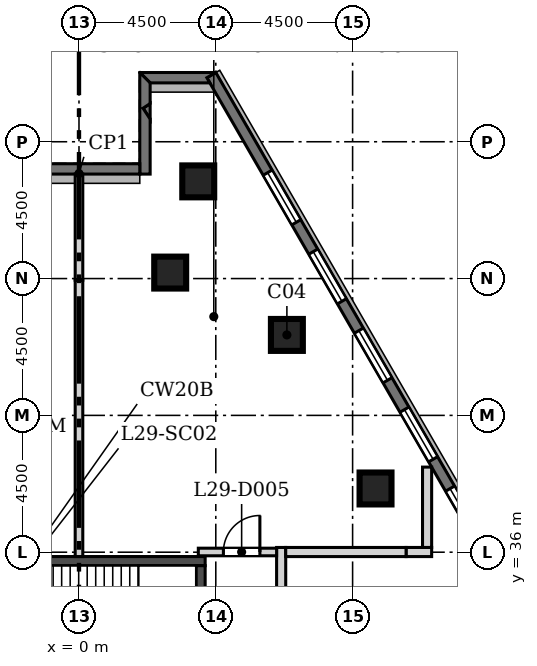
"""IFC4 building model, lengths in metres.
Left out: names, types, materials, properties, quantities, classifications, styles, units other than length and angle.
Written with IfcOpenShell. Run it as: python <this file> out.ifc"""

import sys

from ifc_helpers import new_model, si_unit, direction, frame, frame_2d, origin, origin_2d, place, context, subcontext, project, spatial, polyline, rectangle, outline, extrude, element, fill, save


model = new_model("IFC4")
c1 = context("Model", 3, precision=1e-05, world=origin(), true_north=direction((0.0, 1.0)))
c2 = subcontext(c1, "Body", "Model", "MODEL_VIEW")
j1 = project(units=[si_unit("LENGTHUNIT", "METRE"), si_unit("PLANEANGLEUNIT", "RADIAN")], contexts=[c1])
p1 = place(None, origin())
s1 = spatial("IfcSite", under=j1, at=p1, CompositionType="ELEMENT")
p2 = place(p1, origin())
s2 = spatial("IfcBuilding", under=s1, at=p2, CompositionType="ELEMENT")
p3 = place(p2, frame((0.0, 0.0, 132.1)))
s3 = spatial("IfcBuildingStorey", under=s2, at=p3, CompositionType="ELEMENT", Elevation=132.1)
for number, where, z_axis, x_axis in (
    (1, (9.754, 38.096, 0.0), (0.0, 0.0, 1.0), (1.0, 0.0, 0.0)),
    (2, (6.838, 43.146, 0.0), (0.0, 0.0, 1.0), (1.0, 0.0, 0.0)),
    (3, (3.923, 48.197, 0.0), (0.0, 0.0, 1.0), (1.0, 0.0, 0.0)),
    (4, (3.0, 45.197, 0.0), (0.0, 0.0, 1.0), (1.0, 0.0, 0.0)),
):
    element("IfcColumn", number, at=place(p3, frame(where, z_axis=z_axis, x_axis=x_axis)), inside=s3, PredefinedType="COLUMN", context=c2, shape_type="SweptSolid", body=[
        extrude(rectangle(XDim=1.05, YDim=1.05, at=origin_2d()), origin(), (0.0, 0.0, 1.0), 5.4),
    ])
p4 = place(p3, frame((29.746, 7.709, 0.0), z_axis=(0.0, 0.0, 1.0), x_axis=(-0.500000700546, 0.866024999324, 0.0)))
e5 = element("IfcWall", 5, at=p4, inside=s3, PredefinedType="SOLIDWALL", context=c2, shape_type="SweptSolid", body=[
    extrude(rectangle(XDim=50.787, YDim=0.34, at=frame_2d((25.393, 0.0))), origin(), (0.0, 0.0, 1.0), 5.0),
])
p5 = place(p4, frame((3.197, 0.0, 0.9)))
e6 = element("IfcOpeningElement", 6, at=p5, cuts=e5, PredefinedType="OPENING", context=c2, shape_type="SweptSolid", body=[
    extrude(rectangle(XDim=1.885, YDim=3.0, at=frame_2d((0.942, 1.5))), frame((0.0, 0.18, 0.0), z_axis=(0.0, -1.0, 0.0), x_axis=(1.0, 0.0, 0.0)), (0.0, 0.0, 1.0), 0.36),
])
p6 = place(p4, frame((6.197, 0.0, 0.9)))
e7 = element("IfcOpeningElement", 7, at=p6, cuts=e5, PredefinedType="OPENING", context=c2, shape_type="SweptSolid", body=[
    extrude(rectangle(XDim=1.885, YDim=3.0, at=frame_2d((0.942, 1.5))), frame((0.0, 0.18, 0.0), z_axis=(0.0, -1.0, 0.0), x_axis=(1.0, 0.0, 0.0)), (0.0, 0.0, 1.0), 0.36),
])
p7 = place(p4, frame((9.197, 0.0, 0.9)))
e8 = element("IfcOpeningElement", 8, at=p7, cuts=e5, PredefinedType="OPENING", context=c2, shape_type="SweptSolid", body=[
    extrude(rectangle(XDim=1.885, YDim=3.0, at=frame_2d((0.942, 1.5))), frame((0.0, 0.18, 0.0), z_axis=(0.0, -1.0, 0.0), x_axis=(1.0, 0.0, 0.0)), (0.0, 0.0, 1.0), 0.36),
])
p8 = place(p4, frame((12.197, 0.0, 0.9)))
e9 = element("IfcOpeningElement", 9, at=p8, cuts=e5, PredefinedType="OPENING", context=c2, shape_type="SweptSolid", body=[
    extrude(rectangle(XDim=1.885, YDim=3.0, at=frame_2d((0.942, 1.5))), frame((0.0, 0.18, 0.0), z_axis=(0.0, -1.0, 0.0), x_axis=(1.0, 0.0, 0.0)), (0.0, 0.0, 1.0), 0.36),
])
p9 = place(p4, frame((15.197, 0.0, 0.9)))
e10 = element("IfcOpeningElement", 10, at=p9, cuts=e5, PredefinedType="OPENING", context=c2, shape_type="SweptSolid", body=[
    extrude(rectangle(XDim=1.885, YDim=3.0, at=frame_2d((0.942, 1.5))), frame((0.0, 0.18, 0.0), z_axis=(0.0, -1.0, 0.0), x_axis=(1.0, 0.0, 0.0)), (0.0, 0.0, 1.0), 0.36),
])
p10 = place(p4, frame((18.197, 0.0, 0.9)))
e11 = element("IfcOpeningElement", 11, at=p10, cuts=e5, PredefinedType="OPENING", context=c2, shape_type="SweptSolid", body=[
    extrude(rectangle(XDim=1.885, YDim=3.0, at=frame_2d((0.942, 1.5))), frame((0.0, 0.18, 0.0), z_axis=(0.0, -1.0, 0.0), x_axis=(1.0, 0.0, 0.0)), (0.0, 0.0, 1.0), 0.36),
])
p11 = place(p4, frame((21.197, 0.0, 0.9)))
e12 = element("IfcOpeningElement", 12, at=p11, cuts=e5, PredefinedType="OPENING", context=c2, shape_type="SweptSolid", body=[
    extrude(rectangle(XDim=1.885, YDim=3.0, at=frame_2d((0.942, 1.5))), frame((0.0, 0.18, 0.0), z_axis=(0.0, -1.0, 0.0), x_axis=(1.0, 0.0, 0.0)), (0.0, 0.0, 1.0), 0.36),
])
p12 = place(p4, frame((24.197, 0.0, 0.9)))
e13 = element("IfcOpeningElement", 13, at=p12, cuts=e5, PredefinedType="OPENING", context=c2, shape_type="SweptSolid", body=[
    extrude(rectangle(XDim=1.885, YDim=3.0, at=frame_2d((0.942, 1.5))), frame((0.0, 0.18, 0.0), z_axis=(0.0, -1.0, 0.0), x_axis=(1.0, 0.0, 0.0)), (0.0, 0.0, 1.0), 0.36),
])
p13 = place(p4, frame((27.197, 0.0, 0.9)))
e14 = element("IfcOpeningElement", 14, at=p13, cuts=e5, PredefinedType="OPENING", context=c2, shape_type="SweptSolid", body=[
    extrude(rectangle(XDim=1.885, YDim=3.0, at=frame_2d((0.942, 1.5))), frame((0.0, 0.18, 0.0), z_axis=(0.0, -1.0, 0.0), x_axis=(1.0, 0.0, 0.0)), (0.0, 0.0, 1.0), 0.36),
])
p14 = place(p4, frame((30.197, 0.0, 0.9)))
e15 = element("IfcOpeningElement", 15, at=p14, cuts=e5, PredefinedType="OPENING", context=c2, shape_type="SweptSolid", body=[
    extrude(rectangle(XDim=1.885, YDim=3.0, at=frame_2d((0.942, 1.5))), frame((0.0, 0.18, 0.0), z_axis=(0.0, -1.0, 0.0), x_axis=(1.0, 0.0, 0.0)), (0.0, 0.0, 1.0), 0.36),
])
p15 = place(p4, frame((33.197, 0.0, 0.9)))
e16 = element("IfcOpeningElement", 16, at=p15, cuts=e5, PredefinedType="OPENING", context=c2, shape_type="SweptSolid", body=[
    extrude(rectangle(XDim=1.885, YDim=3.0, at=frame_2d((0.942, 1.5))), frame((0.0, 0.18, 0.0), z_axis=(0.0, -1.0, 0.0), x_axis=(1.0, 0.0, 0.0)), (0.0, 0.0, 1.0), 0.36),
])
p16 = place(p4, frame((36.197, 0.0, 0.9)))
e17 = element("IfcOpeningElement", 17, at=p16, cuts=e5, PredefinedType="OPENING", context=c2, shape_type="SweptSolid", body=[
    extrude(rectangle(XDim=1.885, YDim=3.0, at=frame_2d((0.942, 1.5))), frame((0.0, 0.18, 0.0), z_axis=(0.0, -1.0, 0.0), x_axis=(1.0, 0.0, 0.0)), (0.0, 0.0, 1.0), 0.36),
])
p17 = place(p4, frame((39.197, 0.0, 0.9)))
e18 = element("IfcOpeningElement", 18, at=p17, cuts=e5, PredefinedType="OPENING", context=c2, shape_type="SweptSolid", body=[
    extrude(rectangle(XDim=1.885, YDim=3.0, at=frame_2d((0.942, 1.5))), frame((0.0, 0.18, 0.0), z_axis=(0.0, -1.0, 0.0), x_axis=(1.0, 0.0, 0.0)), (0.0, 0.0, 1.0), 0.36),
])
p18 = place(p4, frame((42.197, 0.0, 0.9)))
e19 = element("IfcOpeningElement", 19, at=p18, cuts=e5, PredefinedType="OPENING", context=c2, shape_type="SweptSolid", body=[
    extrude(rectangle(XDim=1.885, YDim=3.0, at=frame_2d((0.942, 1.5))), frame((0.0, 0.18, 0.0), z_axis=(0.0, -1.0, 0.0), x_axis=(1.0, 0.0, 0.0)), (0.0, 0.0, 1.0), 0.36),
])
p19 = place(p4, frame((45.197, 0.0, 0.9)))
e20 = element("IfcOpeningElement", 20, at=p19, cuts=e5, PredefinedType="OPENING", context=c2, shape_type="SweptSolid", body=[
    extrude(rectangle(XDim=1.885, YDim=3.0, at=frame_2d((0.942, 1.5))), frame((0.0, 0.18, 0.0), z_axis=(0.0, -1.0, 0.0), x_axis=(1.0, 0.0, 0.0)), (0.0, 0.0, 1.0), 0.36),
])
p20 = place(p3, origin())
e21 = element("IfcWall", 21, at=p20, inside=s3, PredefinedType="SOLIDWALL", context=c2, shape_type="SweptSolid", body=[
    extrude(outline(polyline([(1.999, 51.777), (4.501, 51.777), (4.501, 51.777), (4.206, 51.606), (4.305, 51.436), (2.34, 51.436), (1.999, 51.777), (1.999, 51.777)])), origin(), (0.0, 0.0, 1.0), 5.0),
])
p21 = place(p3, origin())
e22 = element("IfcWall", 22, at=p21, inside=s3, PredefinedType="SOLIDWALL", context=c2, shape_type="SweptSolid", body=[
    extrude(outline(polyline([(2.341, 50.246), (2.107, 50.602), (2.341, 50.755), (2.341, 50.246)])), origin(), (0.0, 0.0, 1.0), 4.4),
])
p22 = place(p3, origin())
e23 = element("IfcWall", 23, at=p22, inside=s3, PredefinedType="SOLIDWALL", context=c2, shape_type="SweptSolid", body=[
    extrude(outline(polyline([(2.0, 48.436), (2.0, 51.778), (2.0, 51.778), (2.341, 51.437), (2.341, 50.755), (2.107, 50.602), (2.341, 50.246), (2.341, 48.436), (2.0, 48.436)])), origin(), (0.0, 0.0, 1.0), 5.0),
])
p23 = place(p3, frame((2.0, 48.607, 0.0), z_axis=(0.0, 0.0, 1.0), x_axis=(-1.0, 0.0, 0.0)))
e24 = element("IfcWall", 24, at=p23, inside=s3, PredefinedType="SOLIDWALL", context=c2, shape_type="SweptSolid", body=[
    extrude(rectangle(XDim=4.0, YDim=0.34, at=frame_2d((2.0, 0.0))), origin(), (0.0, 0.0, 1.0), 5.0),
])
p24 = place(p3, frame((-4.15, 35.707, -0.4), z_axis=(0.0, 0.0, 1.0), x_axis=(1.0, 0.0, 0.0)))
e25 = element("IfcWall", 25, at=p24, inside=s3, PredefinedType="SOLIDWALL", context=c2, shape_type="SweptSolid", body=[
    extrude(rectangle(XDim=8.3, YDim=0.3, at=frame_2d((4.15, 0.0))), origin(), (0.0, 0.0, 1.0), 5.4),
])
p25 = place(p3, frame((4.0, 29.057, -0.4), z_axis=(0.0, 0.0, 1.0), x_axis=(0.0, 1.0, 0.0)))
e26 = element("IfcWall", 26, at=p25, inside=s3, PredefinedType="SOLIDWALL", context=c2, shape_type="SweptSolid", body=[
    extrude(rectangle(XDim=6.5, YDim=0.3, at=frame_2d((3.25, 0.0))), origin(), (0.0, 0.0, 1.0), 5.4),
])
p26 = place(p3, frame((6.65, 36.156, 0.0), z_axis=(0.0, 0.0, 1.0), x_axis=(0.0, -1.0, 0.0)))
e27 = element("IfcWall", 27, at=p26, inside=s3, PredefinedType="SOLIDWALL", context=c2, shape_type="SweptSolid", body=[
    extrude(rectangle(XDim=13.357, YDim=0.3, at=frame_2d((6.678, 0.0))), origin(), (0.0, 0.0, 1.0), 5.0),
])
p27 = place(p3, frame((0.0, 48.437, 0.0), z_axis=(0.0, 0.0, 1.0), x_axis=(0.0, -1.0, 0.0)))
e28 = element("IfcWall", 28, at=p27, inside=s3, PredefinedType="SOLIDWALL", context=c2, shape_type="SweptSolid", body=[
    extrude(rectangle(XDim=3.49, YDim=0.25, at=frame_2d((1.745, 0.0))), origin(), (0.0, 0.0, 1.0), 5.0),
])
p28 = place(p3, frame((11.6, 36.006, 0.0), z_axis=(0.0, 0.0, 1.0), x_axis=(-1.0, 0.0, 0.0)))
e29 = element("IfcWall", 29, at=p28, inside=s3, PredefinedType="SOLIDWALL", context=c2, shape_type="SweptSolid", body=[
    extrude(rectangle(XDim=0.842, YDim=0.3, at=frame_2d((0.421, 0.0))), origin(), (0.0, 0.0, 1.0), 5.0),
])
p29 = place(p3, frame((11.45, 38.799, 0.0), z_axis=(0.0, 0.0, 1.0), x_axis=(0.0, -1.0, 0.0)))
e30 = element("IfcWall", 30, at=p29, inside=s3, PredefinedType="SOLIDWALL", context=c2, shape_type="SweptSolid", body=[
    extrude(rectangle(XDim=2.643, YDim=0.3, at=frame_2d((1.322, 0.0))), origin(), (0.0, 0.0, 1.0), 5.0),
])
p30 = place(p3, frame((3.925, 36.007, 0.0), z_axis=(0.0, 0.0, 1.0), x_axis=(1.0, 0.0, 0.0)))
e31 = element("IfcWall", 31, at=p30, inside=s3, PredefinedType="SOLIDWALL", context=c2, shape_type="SweptSolid", body=[
    extrude(rectangle(XDim=2.575, YDim=0.25, at=frame_2d((1.288, 0.0))), origin(), (0.0, 0.0, 1.0), 4.1),
])
p31 = place(p30, frame((0.825, 0.0, 0.0)))
e32 = element("IfcOpeningElement", 32, at=p31, cuts=e31, PredefinedType="OPENING", context=c2, shape_type="SweptSolid", body=[
    extrude(rectangle(XDim=1.2, YDim=2.1, at=frame_2d((0.6, 1.05))), frame((0.0, 0.135, 0.0), z_axis=(0.0, -1.0, 0.0), x_axis=(1.0, 0.0, 0.0)), (0.0, 0.0, 1.0), 0.27),
])
p32 = place(p3, frame((0.0, 44.947, 0.0), z_axis=(0.0, 0.0, 1.0), x_axis=(0.0, -1.0, 0.0)))
e33 = element("IfcWall", 33, at=p32, inside=s3, PredefinedType="SOLIDWALL", context=c2, shape_type="SweptSolid", body=[
    extrude(rectangle(XDim=9.09, YDim=0.25, at=frame_2d((4.545, 0.0))), origin(), (0.0, 0.0, 1.0), 4.25),
])
p33 = place(p3, frame((10.758, 36.006, 0.0), z_axis=(0.0, 0.0, 1.0), x_axis=(-1.0, 0.0, 0.0)))
e34 = element("IfcWall", 34, at=p33, inside=s3, PredefinedType="SOLIDWALL", context=c2, shape_type="SweptSolid", body=[
    extrude(rectangle(XDim=3.958, YDim=0.3, at=frame_2d((1.979, 0.0))), origin(), (0.0, 0.0, 1.0), 4.1),
])
p34 = place(p15, origin())
e35 = element("IfcWindow", 35, at=p34, inside=s3, PartitioningType="SINGLE_PANEL", PredefinedType="WINDOW", context=c2, shape_type="SweptSolid", body=[
    extrude(rectangle(XDim=1.885, YDim=3.0, at=frame_2d((0.942, 1.5))), frame((0.0, 0.11, 0.0), z_axis=(0.0, -1.0, 0.0), x_axis=(1.0, 0.0, 0.0)), (0.0, 0.0, 1.0), 0.06),
])
fill(e16, e35)
p35 = place(p16, origin())
e36 = element("IfcWindow", 36, at=p35, inside=s3, PartitioningType="SINGLE_PANEL", PredefinedType="WINDOW", context=c2, shape_type="SweptSolid", body=[
    extrude(rectangle(XDim=1.885, YDim=3.0, at=frame_2d((0.942, 1.5))), frame((0.0, 0.11, 0.0), z_axis=(0.0, -1.0, 0.0), x_axis=(1.0, 0.0, 0.0)), (0.0, 0.0, 1.0), 0.06),
])
fill(e17, e36)
p36 = place(p17, origin())
e37 = element("IfcWindow", 37, at=p36, inside=s3, PartitioningType="SINGLE_PANEL", PredefinedType="WINDOW", context=c2, shape_type="SweptSolid", body=[
    extrude(rectangle(XDim=1.885, YDim=3.0, at=frame_2d((0.942, 1.5))), frame((0.0, 0.11, 0.0), z_axis=(0.0, -1.0, 0.0), x_axis=(1.0, 0.0, 0.0)), (0.0, 0.0, 1.0), 0.06),
])
fill(e18, e37)
p37 = place(p18, origin())
e38 = element("IfcWindow", 38, at=p37, inside=s3, PartitioningType="SINGLE_PANEL", PredefinedType="WINDOW", context=c2, shape_type="SweptSolid", body=[
    extrude(rectangle(XDim=1.885, YDim=3.0, at=frame_2d((0.942, 1.5))), frame((0.0, 0.11, 0.0), z_axis=(0.0, -1.0, 0.0), x_axis=(1.0, 0.0, 0.0)), (0.0, 0.0, 1.0), 0.06),
])
fill(e19, e38)
p38 = place(p19, origin())
e39 = element("IfcWindow", 39, at=p38, inside=s3, PartitioningType="SINGLE_PANEL", PredefinedType="WINDOW", context=c2, shape_type="SweptSolid", body=[
    extrude(rectangle(XDim=1.885, YDim=3.0, at=frame_2d((0.942, 1.5))), frame((0.0, 0.11, 0.0), z_axis=(0.0, -1.0, 0.0), x_axis=(1.0, 0.0, 0.0)), (0.0, 0.0, 1.0), 0.06),
])
fill(e20, e39)
p39 = place(p31, origin())
e40 = element("IfcDoor", 40, at=p39, inside=s3, OperationType="SINGLE_SWING_RIGHT", PredefinedType="DOOR", context=c2, shape_type="SweptSolid", body=[
    extrude(rectangle(XDim=1.2, YDim=2.1, at=frame_2d((0.6, 1.05))), frame((0.0, 0.025, 0.0), z_axis=(0.0, -1.0, 0.0), x_axis=(1.0, 0.0, 0.0)), (0.0, 0.0, 1.0), 0.05),
])
fill(e32, e40)
save(model, sys.argv[1])
